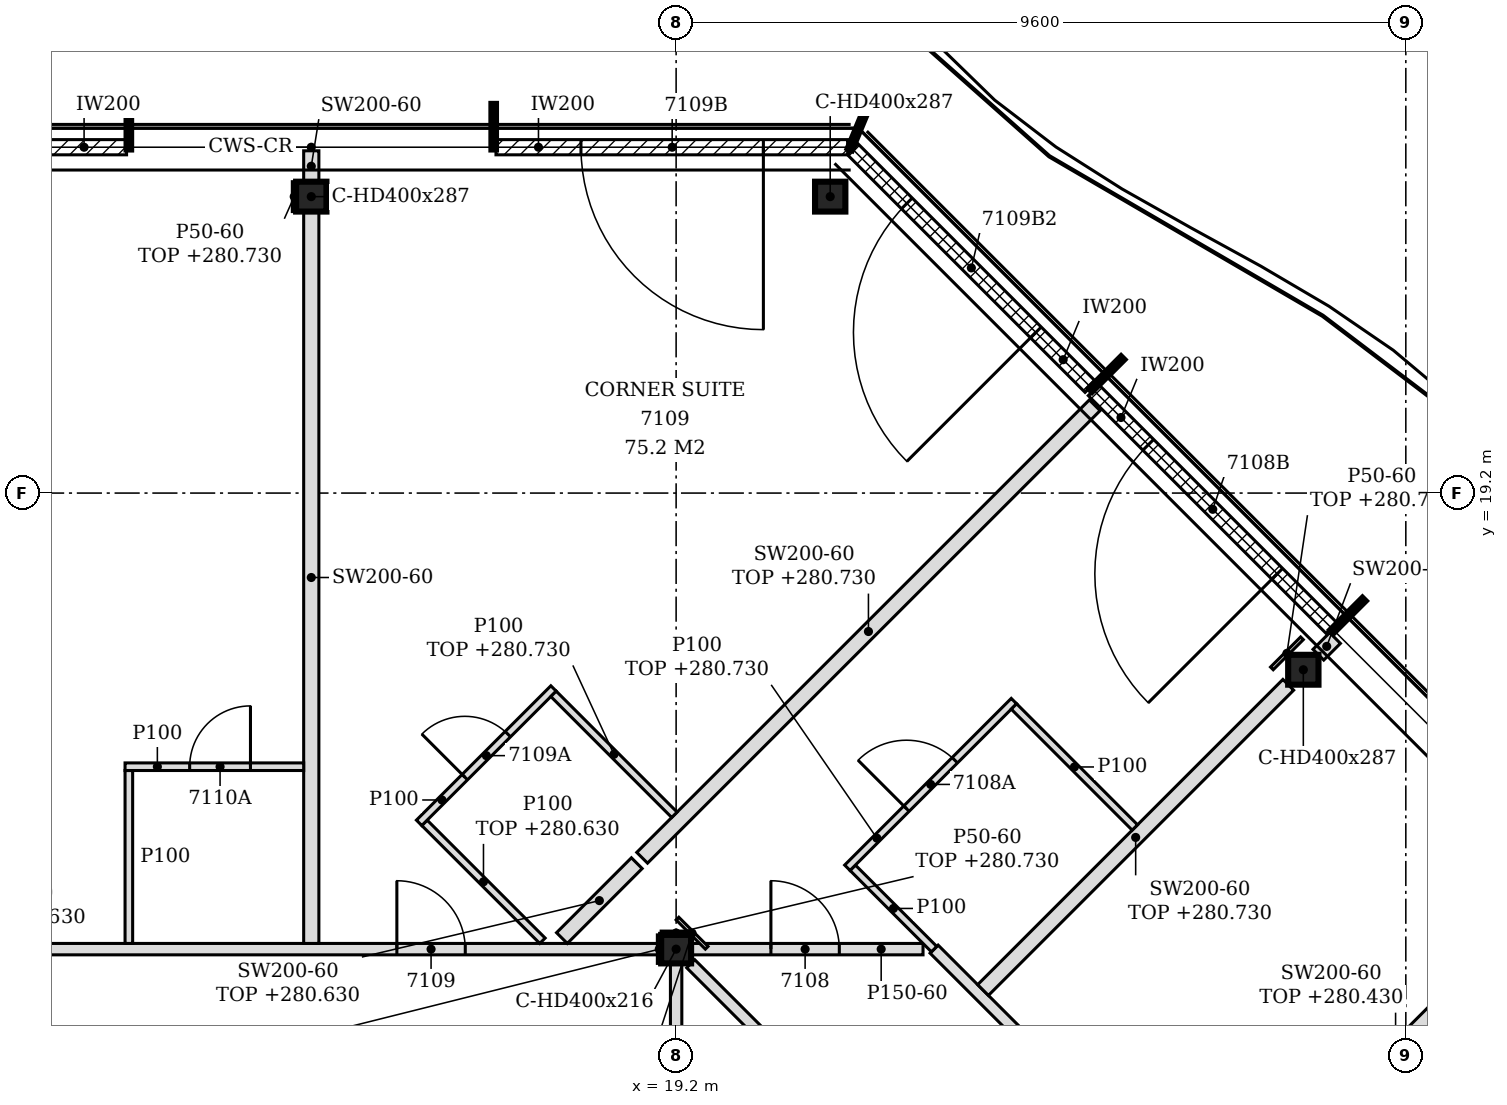
"""IFC4 building model, lengths in metres.
Left out: names, types, materials, properties, quantities, classifications, styles, units other than length and angle.
Written with IfcOpenShell. Run it as: python <this file> out.ifc"""

import sys

from ifc_helpers import new_model, si_unit, direction, frame, frame_2d, origin, origin_2d, place, context, subcontext, project, spatial, polyline, rectangle, i_section, outline, extrude, element, fill, save


model = new_model("IFC4")
c1 = context("Model", 3, precision=1e-05, world=origin(), true_north=direction((0.0, 1.0)))
c2 = subcontext(c1, "Body", "Model", "MODEL_VIEW")
j1 = project(units=[si_unit("LENGTHUNIT", "METRE"), si_unit("PLANEANGLEUNIT", "RADIAN")], contexts=[c1])
p1 = place(None, origin())
s1 = spatial("IfcSite", under=j1, at=p1, CompositionType="ELEMENT")
p2 = place(p1, origin())
s2 = spatial("IfcBuilding", under=s1, at=p2, CompositionType="ELEMENT")
p3 = place(p2, frame((0.0, 0.0, 277.8)))
s3 = spatial("IfcBuildingStorey", under=s2, at=p3, CompositionType="ELEMENT", Elevation=277.8)
for number, where, z_axis, x_axis in (
    (1, (27.451, 16.876, -0.15), (0.0, 0.0, 1.0), (1.0, 0.0, 0.0)),
    (2, (21.227, 23.1, -0.15), (0.0, 0.0, 1.0), (1.0, 0.0, 0.0)),
    (3, (14.4, 23.1, -0.15), (0.0, 0.0, 1.0), (1.0, 0.0, 0.0)),
):
    element("IfcColumn", number, at=place(p3, frame(where, z_axis=z_axis, x_axis=x_axis)), inside=s3, PredefinedType="COLUMN", context=c2, shape_type="SweptSolid", body=[
        extrude(i_section(OverallWidth=0.399, OverallDepth=0.393, WebThickness=0.023, FlangeThickness=0.037, FilletRadius=0.015, at=origin_2d()), origin(), (0.0, 0.0, 1.0), 3.6),
    ])
p4 = place(p3, frame((19.2, 13.2, -0.15), z_axis=(0.0, 0.0, 1.0), x_axis=(1.0, 0.0, 0.0)))
e4 = element("IfcColumn", 4, at=p4, inside=s3, PredefinedType="COLUMN", context=c2, shape_type="SweptSolid", body=[
    extrude(i_section(OverallWidth=0.394, OverallDepth=0.375, WebThickness=0.017, FlangeThickness=0.028, FilletRadius=0.015, at=origin_2d()), origin(), (0.0, 0.0, 1.0), 3.6),
])
p5 = place(p3, frame((27.826, 17.42, 0.0), z_axis=(0.0, 0.0, 1.0), x_axis=(-0.707079231393, 0.707134329907, 0.0)))
e5 = element("IfcWall", 5, at=p5, inside=s3, PredefinedType="NOTDEFINED", context=c2, shape_type="SweptSolid", body=[
    extrude(rectangle(XDim=4.431, YDim=0.2, at=frame_2d((2.215, 0.0))), origin(), (0.0, 0.0, 1.0), 3.45),
])
p6 = place(p5, frame((1.015, 0.0, 0.0)))
e6 = element("IfcOpeningElement", 6, at=p6, cuts=e5, PredefinedType="OPENING", context=c2, shape_type="SweptSolid", body=[
    extrude(rectangle(XDim=2.4, YDim=2.4, at=frame_2d((1.2, 1.2))), frame((0.0, 0.11, 0.0), z_axis=(0.0, -1.0, 0.0), x_axis=(1.0, 0.0, 0.0)), (0.0, 0.0, 1.0), 0.22),
])
p7 = place(p3, frame((24.651, 20.596, 0.0), z_axis=(0.0, 0.0, 1.0), x_axis=(-0.707134392299, 0.707079168996, 0.0)))
e7 = element("IfcWall", 7, at=p7, inside=s3, PredefinedType="NOTDEFINED", context=c2, shape_type="SweptSolid", body=[
    extrude(rectangle(XDim=4.421, YDim=0.2, at=frame_2d((2.21, 0.0))), origin(), (0.0, 0.0, 1.0), 3.45),
])
p8 = place(p7, frame((1.016, 0.0, 0.0)))
e8 = element("IfcOpeningElement", 8, at=p8, cuts=e7, PredefinedType="OPENING", context=c2, shape_type="SweptSolid", body=[
    extrude(rectangle(XDim=2.4, YDim=2.4, at=frame_2d((1.2, 1.2))), frame((0.0, 0.11, 0.0), z_axis=(0.0, -1.0, 0.0), x_axis=(1.0, 0.0, 0.0)), (0.0, 0.0, 1.0), 0.22),
])
p9 = place(p3, frame((21.457, 23.75, 0.0), z_axis=(0.0, 0.0, 1.0), x_axis=(-1.0, 0.0, 0.0)))
e9 = element("IfcWall", 9, at=p9, inside=s3, PredefinedType="NOTDEFINED", context=c2, shape_type="SweptSolid", body=[
    extrude(rectangle(XDim=4.626, YDim=0.2, at=frame_2d((2.313, 0.0))), origin(), (0.0, 0.0, 1.0), 3.45),
])
p10 = place(p9, frame((1.108, 0.0, 0.0)))
e10 = element("IfcOpeningElement", 10, at=p10, cuts=e9, PredefinedType="OPENING", context=c2, shape_type="SweptSolid", body=[
    extrude(rectangle(XDim=2.4, YDim=2.4, at=frame_2d((1.2, 1.2))), frame((0.0, 0.11, 0.0), z_axis=(0.0, -1.0, 0.0), x_axis=(1.0, 0.0, 0.0)), (0.0, 0.0, 1.0), 0.22),
])
p11 = place(p3, frame((11.97, 23.75, 0.0), z_axis=(0.0, 0.0, 1.0), x_axis=(-1.0, 0.0, 0.0)))
e11 = element("IfcWall", 11, at=p11, inside=s3, PredefinedType="NOTDEFINED", context=c2, shape_type="SweptSolid", body=[
    extrude(rectangle(XDim=4.626, YDim=0.2, at=frame_2d((2.313, 0.0))), origin(), (0.0, 0.0, 1.0), 3.45),
])
p12 = place(p11, frame((1.118, 0.0, 0.0)))
e12 = element("IfcOpeningElement", 12, at=p12, cuts=e11, PredefinedType="OPENING", context=c2, shape_type="SweptSolid", body=[
    extrude(rectangle(XDim=2.4, YDim=2.4, at=frame_2d((1.2, 1.2))), frame((0.0, 0.11, 0.0), z_axis=(0.0, -1.0, 0.0), x_axis=(1.0, 0.0, 0.0)), (0.0, 0.0, 1.0), 0.22),
])
p13 = place(p3, frame((29.947, 2.453, 0.0), z_axis=(0.0, 0.0, 1.0), x_axis=(-0.707098603185, 0.707114959093, 0.0)))
e13 = element("IfcWall", 13, at=p13, inside=s3, PredefinedType="PARTITIONING", context=c2, shape_type="SweptSolid", body=[
    extrude(rectangle(XDim=14.927, YDim=0.15, at=frame_2d((7.463, 0.0))), origin(), (0.0, 0.0, 1.0), 2.88),
])
p14 = place(p13, frame((1.325, 0.0, 0.0)))
e14 = element("IfcOpeningElement", 14, at=p14, cuts=e13, PredefinedType="OPENING", context=c2, shape_type="SweptSolid", body=[
    extrude(rectangle(XDim=0.8, YDim=2.1, at=frame_2d((0.4, 1.05))), frame((0.0, 0.085, 0.0), z_axis=(0.0, -1.0, 0.0), x_axis=(1.0, 0.0, 0.0)), (0.0, 0.0, 1.0), 0.17),
])
p15 = place(p13, frame((4.476, 0.0, 0.0)))
e15 = element("IfcOpeningElement", 15, at=p15, cuts=e13, PredefinedType="OPENING", context=c2, shape_type="SweptSolid", body=[
    extrude(rectangle(XDim=0.8, YDim=2.1, at=frame_2d((0.4, 1.05))), frame((0.0, 0.085, 0.0), z_axis=(0.0, -1.0, 0.0), x_axis=(1.0, 0.0, 0.0)), (0.0, 0.0, 1.0), 0.17),
])
p16 = place(p3, frame((19.2, 2.587, 0.0), z_axis=(0.0, 0.0, 1.0), x_axis=(0.0, 1.0, 0.0)))
e16 = element("IfcWall", 16, at=p16, inside=s3, PredefinedType="PARTITIONING", context=c2, shape_type="SweptSolid", body=[
    extrude(rectangle(XDim=10.425, YDim=0.15, at=frame_2d((5.212, 0.0))), origin(), (0.0, 0.0, 1.0), 2.83),
])
p17 = place(p16, frame((2.962, 0.0, 0.0)))
e17 = element("IfcOpeningElement", 17, at=p17, cuts=e16, PredefinedType="OPENING", context=c2, shape_type="SweptSolid", body=[
    extrude(rectangle(XDim=0.9, YDim=2.1, at=frame_2d((0.45, 1.05))), frame((0.0, 0.085, 0.0), z_axis=(0.0, -1.0, 0.0), x_axis=(1.0, 0.0, 0.0)), (0.0, 0.0, 1.0), 0.17),
])
p18 = place(p3, frame((32.272, 3.522, 0.0), z_axis=(0.0, 0.0, 1.0), x_axis=(-0.707106781187, 0.707106781187, 0.0)))
e18 = element("IfcWall", 18, at=p18, inside=s3, PredefinedType="PARTITIONING", context=c2, shape_type="SweptSolid", body=[
    extrude(rectangle(XDim=13.687, YDim=0.15, at=frame_2d((6.843, 0.0))), origin(), (0.0, 0.0, 1.0), 2.88),
])
p19 = place(p18, frame((1.988, 0.0, 0.0)))
e19 = element("IfcOpeningElement", 19, at=p19, cuts=e18, PredefinedType="OPENING", context=c2, shape_type="SweptSolid", body=[
    extrude(rectangle(XDim=0.9, YDim=2.1, at=frame_2d((0.45, 1.05))), frame((0.0, 0.085, 0.0), z_axis=(0.0, -1.0, 0.0), x_axis=(1.0, 0.0, 0.0)), (0.0, 0.0, 1.0), 0.17),
])
p20 = place(p18, frame((6.303, 0.0, 0.0)))
e20 = element("IfcOpeningElement", 20, at=p20, cuts=e18, PredefinedType="OPENING", context=c2, shape_type="SweptSolid", body=[
    extrude(rectangle(XDim=0.9, YDim=2.1, at=frame_2d((0.45, 1.05))), frame((0.0, 0.085, 0.0), z_axis=(0.0, -1.0, 0.0), x_axis=(1.0, 0.0, 0.0)), (0.0, 0.0, 1.0), 0.17),
])
p21 = place(p18, frame((10.2, 0.0, 0.0)))
e21 = element("IfcOpeningElement", 21, at=p21, cuts=e18, PredefinedType="OPENING", context=c2, shape_type="SweptSolid", body=[
    extrude(rectangle(XDim=0.9, YDim=2.1, at=frame_2d((0.45, 1.05))), frame((0.0, 0.085, 0.0), z_axis=(0.0, -1.0, 0.0), x_axis=(1.0, 0.0, 0.0)), (0.0, 0.0, 1.0), 0.17),
])
p22 = place(p3, frame((26.35, 9.55, 0.0), z_axis=(0.0, 0.0, 1.0), x_axis=(0.707088140984, 0.707125420898, 0.0)))
e22 = element("IfcWall", 22, at=p22, inside=s3, PredefinedType="PARTITIONING", context=c2, shape_type="SweptSolid", body=[
    extrude(rectangle(XDim=6.549, YDim=0.2, at=frame_2d((3.274, 0.0))), origin(), (0.0, 0.0, 1.0), 2.63),
])
p23 = place(p3, frame((23.238, 12.662, 0.0), z_axis=(0.0, 0.0, 1.0), x_axis=(0.707128276734, 0.707085284986, 0.0)))
e23 = element("IfcWall", 23, at=p23, inside=s3, PredefinedType="PARTITIONING", context=c2, shape_type="SweptSolid", body=[
    extrude(rectangle(XDim=5.679, YDim=0.2, at=frame_2d((2.839, 0.0))), origin(), (0.0, 0.0, 1.0), 2.93),
])
p24 = place(p3, frame((7.397, 13.2, 0.0), z_axis=(0.0, 0.0, 1.0), x_axis=(1.0, 0.0, 0.0)))
e24 = element("IfcWall", 24, at=p24, inside=s3, PredefinedType="PARTITIONING", context=c2, shape_type="SweptSolid", body=[
    extrude(rectangle(XDim=11.606, YDim=0.15, at=frame_2d((5.803, 0.0))), origin(), (0.0, 0.0, 1.0), 2.83),
])
p25 = place(p24, frame((8.129, 0.0, 0.0)))
e25 = element("IfcOpeningElement", 25, at=p25, cuts=e24, PredefinedType="OPENING", context=c2, shape_type="SweptSolid", body=[
    extrude(rectangle(XDim=0.9, YDim=2.1, at=frame_2d((0.45, 1.05))), frame((0.0, 0.085, 0.0), z_axis=(0.0, -1.0, 0.0), x_axis=(1.0, 0.0, 0.0)), (0.0, 0.0, 1.0), 0.17),
])
p26 = place(p3, frame((19.397, 13.2, 0.0), z_axis=(0.0, 0.0, 1.0), x_axis=(1.0, 0.0, 0.0)))
e26 = element("IfcWall", 26, at=p26, inside=s3, PredefinedType="PARTITIONING", context=c2, shape_type="SweptSolid", body=[
    extrude(rectangle(XDim=3.051, YDim=0.15, at=frame_2d((1.526, 0.0))), origin(), (0.0, 0.0, 1.0), 3.45),
])
p27 = place(p26, frame((1.05, 0.0, 0.0)))
e27 = element("IfcOpeningElement", 27, at=p27, cuts=e26, PredefinedType="OPENING", context=c2, shape_type="SweptSolid", body=[
    extrude(rectangle(XDim=0.9, YDim=2.1, at=frame_2d((0.45, 1.05))), frame((0.0, 0.085, 0.0), z_axis=(0.0, -1.0, 0.0), x_axis=(1.0, 0.0, 0.0)), (0.0, 0.0, 1.0), 0.17),
])
p28 = place(p3, frame((22.594, 13.2, 0.0), z_axis=(0.0, 0.0, 1.0), x_axis=(-0.707106781187, 0.707106781187, 0.0)))
e28 = element("IfcWall", 28, at=p28, inside=s3, PredefinedType="PARTITIONING", context=c2, shape_type="SweptSolid", body=[
    extrude(rectangle(XDim=1.514, YDim=0.1, at=frame_2d((0.757, 0.0))), origin(), (0.0, 0.0, 1.0), 3.45),
])
p29 = place(p3, frame((12.0, 13.275, 0.0), z_axis=(0.0, 0.0, 1.0), x_axis=(0.0, 1.0, 0.0)))
e29 = element("IfcWall", 29, at=p29, inside=s3, PredefinedType="PARTITIONING", context=c2, shape_type="SweptSolid", body=[
    extrude(outline(polyline([(0.0, 0.0), (2.275, 0.0), (2.275, 3.45), (0.075, 3.45), (0.073, 2.83), (0.0, 2.83), (0.0, 0.0)])), frame((0.0, 0.05, 0.0), z_axis=(0.0, -1.0, 0.0), x_axis=(1.0, 0.0, 0.0)), (0.0, 0.0, 1.0), 0.1),
])
p30 = place(p3, frame((14.4, 13.275, 0.0), z_axis=(0.0, 0.0, 1.0), x_axis=(0.0, 1.0, 0.0)))
e30 = element("IfcWall", 30, at=p30, inside=s3, PredefinedType="PARTITIONING", context=c2, shape_type="SweptSolid", body=[
    extrude(outline(polyline([(0.0, 0.0), (9.629, 0.0), (9.628, 3.45), (6.03, 3.45), (6.028, 2.88), (5.82, 2.88), (5.818, 3.45), (0.075, 3.45), (0.073, 2.83), (0.0, 2.83), (0.0, 0.0)])), frame((0.0, 0.1, 0.0), z_axis=(0.0, -1.0, 0.0), x_axis=(1.0, 0.0, 0.0)), (0.0, 0.0, 1.0), 0.2),
])
p31 = place(p3, frame((17.442, 13.31, 0.0), z_axis=(0.0, 0.0, 1.0), x_axis=(-0.707273623788, 0.706939899209, 0.0)))
e31 = element("IfcWall", 31, at=p31, inside=s3, PredefinedType="PARTITIONING", context=c2, shape_type="SweptSolid", body=[
    extrude(rectangle(XDim=2.195, YDim=0.1, at=frame_2d((1.097, 0.0))), origin(), (0.0, 0.0, 1.0), 2.83),
])
p32 = place(p3, frame((17.698, 13.346, 0.0), z_axis=(0.0, 0.0, 1.0), x_axis=(0.707019164958, 0.70719438656, 0.0)))
e32 = element("IfcWall", 32, at=p32, inside=s3, PredefinedType="PARTITIONING", context=c2, shape_type="SweptSolid", body=[
    extrude(rectangle(XDim=1.393, YDim=0.2, at=frame_2d((0.697, 0.0))), origin(), (0.0, 0.0, 1.0), 2.83),
])
p33 = place(p3, frame((21.453, 14.271, 0.0), z_axis=(0.0, 0.0, 1.0), x_axis=(0.70690988682, 0.707303620743, 0.0)))
e33 = element("IfcWall", 33, at=p33, inside=s3, PredefinedType="PARTITIONING", context=c2, shape_type="SweptSolid", body=[
    extrude(rectangle(XDim=3.1, YDim=0.1, at=frame_2d((1.55, 0.0))), origin(), (0.0, 0.0, 1.0), 2.93),
])
p34 = place(p33, frame((1.1, 0.0, 0.0)))
e34 = element("IfcOpeningElement", 34, at=p34, cuts=e33, PredefinedType="OPENING", context=c2, shape_type="SweptSolid", body=[
    extrude(rectangle(XDim=0.9, YDim=2.1, at=frame_2d((0.45, 1.05))), frame((0.0, 0.06, 0.0), z_axis=(0.0, -1.0, 0.0), x_axis=(1.0, 0.0, 0.0)), (0.0, 0.0, 1.0), 0.12),
])
p35 = place(p3, frame((18.753, 14.402, 0.0), z_axis=(0.0, 0.0, 1.0), x_axis=(0.707179267043, 0.707034287899, 0.0)))
e35 = element("IfcWall", 35, at=p35, inside=s3, PredefinedType="PARTITIONING", context=c2, shape_type="SweptSolid", body=[
    extrude(rectangle(XDim=8.42, YDim=0.2, at=frame_2d((4.21, 0.0))), origin(), (0.0, 0.0, 1.0), 2.93),
])
p36 = place(p3, frame((25.235, 14.801, 0.0), z_axis=(0.0, 0.0, 1.0), x_axis=(-0.706944047094, 0.707269477836, 0.0)))
e36 = element("IfcWall", 36, at=p36, inside=s3, PredefinedType="PARTITIONING", context=c2, shape_type="SweptSolid", body=[
    extrude(rectangle(XDim=2.251, YDim=0.1, at=frame_2d((1.125, 0.0))), origin(), (0.0, 0.0, 1.0), 3.45),
])
p37 = place(p3, frame((15.819, 14.862, 0.0), z_axis=(0.0, 0.0, 1.0), x_axis=(0.707350821469, 0.706862656651, 0.0)))
e37 = element("IfcWall", 37, at=p37, inside=s3, PredefinedType="PARTITIONING", context=c2, shape_type="SweptSolid", body=[
    extrude(rectangle(XDim=2.5, YDim=0.1, at=frame_2d((1.25, 0.0))), origin(), (0.0, 0.0, 1.0), 3.45),
])
p38 = place(p37, frame((0.851, 0.0, 0.0)))
e38 = element("IfcOpeningElement", 38, at=p38, cuts=e37, PredefinedType="OPENING", context=c2, shape_type="SweptSolid", body=[
    extrude(rectangle(XDim=0.8, YDim=2.1, at=frame_2d((0.4, 1.05))), frame((0.0, 0.06, 0.0), z_axis=(0.0, -1.0, 0.0), x_axis=(1.0, 0.0, 0.0)), (0.0, 0.0, 1.0), 0.12),
])
p39 = place(p3, frame((19.177, 14.968, 0.0), z_axis=(0.0, 0.0, 1.0), x_axis=(-0.706889644159, 0.707323851557, 0.0)))
e39 = element("IfcWall", 39, at=p39, inside=s3, PredefinedType="PARTITIONING", context=c2, shape_type="SweptSolid", body=[
    extrude(rectangle(XDim=2.249, YDim=0.1, at=frame_2d((1.125, 0.0))), origin(), (0.0, 0.0, 1.0), 2.93),
])
p40 = place(p3, frame((11.95, 15.6, 0.0), z_axis=(0.0, 0.0, 1.0), x_axis=(1.0, 0.0, 0.0)))
e40 = element("IfcWall", 40, at=p40, inside=s3, PredefinedType="PARTITIONING", context=c2, shape_type="SweptSolid", body=[
    extrude(rectangle(XDim=2.35, YDim=0.1, at=frame_2d((1.175, 0.0))), origin(), (0.0, 0.0, 1.0), 3.45),
])
p41 = place(p40, frame((0.85, 0.0, 0.0)))
e41 = element("IfcOpeningElement", 41, at=p41, cuts=e40, PredefinedType="OPENING", context=c2, shape_type="SweptSolid", body=[
    extrude(rectangle(XDim=0.8, YDim=2.1, at=frame_2d((0.4, 1.05))), frame((0.0, 0.06, 0.0), z_axis=(0.0, -1.0, 0.0), x_axis=(1.0, 0.0, 0.0)), (0.0, 0.0, 1.0), 0.12),
])
p42 = place(p3, frame((27.65, 17.073, 0.0), z_axis=(0.0, 0.0, 1.0), x_axis=(0.707106781187, 0.707106781187, 0.0)))
e42 = element("IfcWall", 42, at=p42, inside=s3, PredefinedType="PARTITIONING", context=c2, shape_type="SweptSolid", body=[
    extrude(rectangle(XDim=0.31, YDim=0.2, at=frame_2d((0.155, 0.0))), origin(), (0.0, 0.0, 1.0), 3.45),
])
p43 = place(p3, frame((14.4, 23.296, 0.0), z_axis=(0.0, 0.0, 1.0), x_axis=(0.0, 1.0, 0.0)))
e43 = element("IfcWall", 43, at=p43, inside=s3, PredefinedType="PARTITIONING", context=c2, shape_type="SweptSolid", body=[
    extrude(rectangle(XDim=0.406, YDim=0.2, at=frame_2d((0.203, 0.0))), origin(), (0.0, 0.0, 1.0), 3.45),
])
p44 = place(p3, frame((18.978, 13.012, 0.0), z_axis=(0.0, 0.0, 1.0), x_axis=(0.0, 1.0, 0.0)))
e44 = element("IfcWall", 44, at=p44, inside=s3, PredefinedType="PARTITIONING", context=c2, shape_type="SweptSolid", body=[
    extrude(rectangle(XDim=0.375, YDim=0.05, at=frame_2d((0.188, 0.0))), origin(), (0.0, 0.0, 1.0), 2.83),
])
p45 = place(p3, frame((19.602, 13.218, 0.0), z_axis=(0.0, 0.0, 1.0), x_axis=(-0.707106781187, 0.707106781187, 0.0)))
e45 = element("IfcWall", 45, at=p45, inside=s3, PredefinedType="PARTITIONING", context=c2, shape_type="SweptSolid", body=[
    extrude(rectangle(XDim=0.544, YDim=0.05, at=frame_2d((0.272, 0.0))), origin(), (0.0, 0.0, 1.0), 2.93),
])
p46 = place(p3, frame((27.038, 16.893, 0.0), z_axis=(0.0, 0.0, 1.0), x_axis=(0.707106781187, 0.707106781187, 0.0)))
e46 = element("IfcWall", 46, at=p46, inside=s3, PredefinedType="PARTITIONING", context=c2, shape_type="SweptSolid", body=[
    extrude(rectangle(XDim=0.56, YDim=0.05, at=frame_2d((0.28, 0.0))), origin(), (0.0, 0.0, 1.0), 2.93),
])
p47 = place(p3, frame((19.003, 13.413, 0.0), z_axis=(0.0, 0.0, 1.0), x_axis=(1.0, 0.0, 0.0)))
e47 = element("IfcWall", 47, at=p47, inside=s3, PredefinedType="PARTITIONING", context=c2, shape_type="SweptSolid", body=[
    extrude(rectangle(XDim=0.394, YDim=0.05, at=frame_2d((0.197, 0.0))), origin(), (0.0, 0.0, 1.0), 2.93),
])
p48 = place(p3, frame((14.176, 22.904, 0.0), z_axis=(0.0, 0.0, 1.0), x_axis=(0.0, 1.0, 0.0)))
e48 = element("IfcWall", 48, at=p48, inside=s3, PredefinedType="PARTITIONING", context=c2, shape_type="SweptSolid", body=[
    extrude(rectangle(XDim=0.393, YDim=0.05, at=frame_2d((0.196, 0.0))), origin(), (0.0, 0.0, 1.0), 2.93),
])
p49 = place(p6, origin())
e49 = element("IfcDoor", 49, at=p49, inside=s3, OperationType="SINGLE_SWING_LEFT", PredefinedType="DOOR", context=c2, shape_type="SweptSolid", body=[
    extrude(rectangle(XDim=2.4, YDim=2.4, at=frame_2d((1.2, 1.2))), frame((0.0, 0.025, 0.0), z_axis=(0.0, -1.0, 0.0), x_axis=(1.0, 0.0, 0.0)), (0.0, 0.0, 1.0), 0.05),
])
fill(e6, e49)
p50 = place(p8, origin())
e50 = element("IfcDoor", 50, at=p50, inside=s3, OperationType="SINGLE_SWING_LEFT", PredefinedType="DOOR", context=c2, shape_type="SweptSolid", body=[
    extrude(rectangle(XDim=2.4, YDim=2.4, at=frame_2d((1.2, 1.2))), frame((0.0, 0.025, 0.0), z_axis=(0.0, -1.0, 0.0), x_axis=(1.0, 0.0, 0.0)), (0.0, 0.0, 1.0), 0.05),
])
fill(e8, e50)
p51 = place(p10, origin())
e51 = element("IfcDoor", 51, at=p51, inside=s3, OperationType="SINGLE_SWING_LEFT", PredefinedType="DOOR", context=c2, shape_type="SweptSolid", body=[
    extrude(rectangle(XDim=2.4, YDim=2.4, at=frame_2d((1.2, 1.2))), frame((0.0, 0.025, 0.0), z_axis=(0.0, -1.0, 0.0), x_axis=(1.0, 0.0, 0.0)), (0.0, 0.0, 1.0), 0.05),
])
fill(e10, e51)
p52 = place(p27, origin())
e52 = element("IfcDoor", 52, at=p52, inside=s3, OperationType="SINGLE_SWING_LEFT", PredefinedType="DOOR", context=c2, shape_type="SweptSolid", body=[
    extrude(rectangle(XDim=0.9, YDim=2.1, at=frame_2d((0.45, 1.05))), frame((0.0, 0.025, 0.0), z_axis=(0.0, -1.0, 0.0), x_axis=(1.0, 0.0, 0.0)), (0.0, 0.0, 1.0), 0.05),
])
fill(e27, e52)
p53 = place(p34, origin())
e53 = element("IfcDoor", 53, at=p53, inside=s3, OperationType="SINGLE_SWING_LEFT", PredefinedType="DOOR", context=c2, shape_type="SweptSolid", body=[
    extrude(rectangle(XDim=0.9, YDim=2.1, at=frame_2d((0.45, 1.05))), frame((0.0, 0.025, 0.0), z_axis=(0.0, -1.0, 0.0), x_axis=(1.0, 0.0, 0.0)), (0.0, 0.0, 1.0), 0.05),
])
fill(e34, e53)
p54 = place(p25, origin())
e54 = element("IfcDoor", 54, at=p54, inside=s3, OperationType="SINGLE_SWING_LEFT", PredefinedType="DOOR", context=c2, shape_type="SweptSolid", body=[
    extrude(rectangle(XDim=0.9, YDim=2.1, at=frame_2d((0.45, 1.05))), frame((0.0, 0.025, 0.0), z_axis=(0.0, -1.0, 0.0), x_axis=(1.0, 0.0, 0.0)), (0.0, 0.0, 1.0), 0.05),
])
fill(e25, e54)
p55 = place(p38, origin())
e55 = element("IfcDoor", 55, at=p55, inside=s3, OperationType="SINGLE_SWING_LEFT", PredefinedType="DOOR", context=c2, shape_type="SweptSolid", body=[
    extrude(rectangle(XDim=0.8, YDim=2.1, at=frame_2d((0.4, 1.05))), frame((0.0, 0.025, 0.0), z_axis=(0.0, -1.0, 0.0), x_axis=(1.0, 0.0, 0.0)), (0.0, 0.0, 1.0), 0.05),
])
fill(e38, e55)
p56 = place(p41, origin())
e56 = element("IfcDoor", 56, at=p56, inside=s3, OperationType="SINGLE_SWING_RIGHT", PredefinedType="DOOR", context=c2, shape_type="SweptSolid", body=[
    extrude(rectangle(XDim=0.8, YDim=2.1, at=frame_2d((0.4, 1.05))), frame((0.0, 0.025, 0.0), z_axis=(0.0, -1.0, 0.0), x_axis=(1.0, 0.0, 0.0)), (0.0, 0.0, 1.0), 0.05),
])
fill(e41, e56)
save(model, sys.argv[1])
